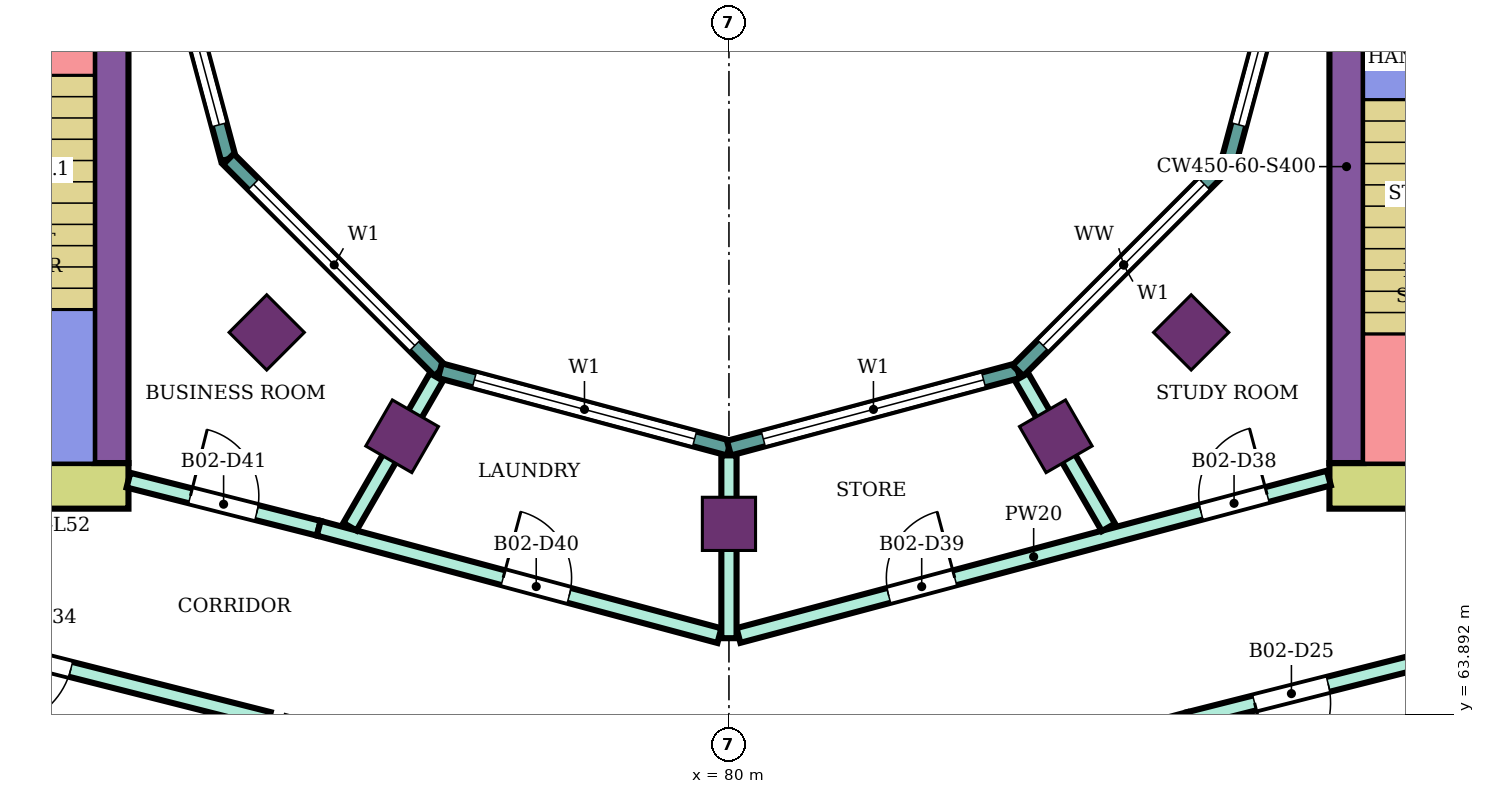
"""IFC4 building model, lengths in metres.
Left out: names, types, materials, properties, quantities, classifications, styles, units other than length and angle.
Written with IfcOpenShell. Run it as: python <this file> out.ifc"""

import sys

from ifc_helpers import new_model, si_unit, direction, frame, frame_2d, origin, origin_2d, place, context, subcontext, project, spatial, rectangle, extrude, element, fill, save


model = new_model("IFC4")
c1 = context("Model", 3, precision=1e-05, world=origin(), true_north=direction((0.0, 1.0)))
c2 = subcontext(c1, "Body", "Model", "MODEL_VIEW")
j1 = project(units=[si_unit("LENGTHUNIT", "METRE"), si_unit("PLANEANGLEUNIT", "RADIAN")], contexts=[c1])
p1 = place(None, origin())
s1 = spatial("IfcSite", under=j1, at=p1, CompositionType="ELEMENT")
p2 = place(p1, origin())
s2 = spatial("IfcBuilding", under=s1, at=p2, CompositionType="ELEMENT")
p3 = place(p2, frame((0.0, 0.0, 225.1)))
s3 = spatial("IfcBuildingStorey", under=s2, at=p3, CompositionType="ELEMENT", Elevation=225.1)
for number, where, z_axis, x_axis in (
    (1, (73.919, 68.919, 0.0), (0.0, 0.0, 1.0), (-0.707, -0.707, 0.0)),
    (2, (75.7, 67.552, 0.0), (0.0, 0.0, 1.0), (-0.5, -0.866, 0.0)),
    (3, (80.0, 66.4, 0.0), (0.0, 0.0, 1.0), (0.0, -1.0, 0.0)),
    (4, (84.3, 67.552, 0.0), (0.0, 0.0, 1.0), (0.5, -0.866, 0.0)),
    (5, (86.081, 68.919, 0.0), (0.0, 0.0, 1.0), (0.707, -0.707, 0.0)),
):
    element("IfcColumn", number, at=place(p3, frame(where, z_axis=z_axis, x_axis=x_axis)), inside=s3, PredefinedType="COLUMN", context=c2, shape_type="SweptSolid", body=[
        extrude(rectangle(XDim=0.7, YDim=0.7, at=origin_2d()), origin(), (0.0, 0.0, 1.0), 4.2),
    ])
p4 = place(p3, frame((87.9, 66.9, 0.0), z_axis=(0.0, 0.0, 1.0), x_axis=(1.0, 0.0, 0.0)))
e6 = element("IfcWall", 6, at=p4, inside=s3, PredefinedType="SHEAR", context=c2, shape_type="SweptSolid", body=[
    extrude(rectangle(XDim=14.9, YDim=0.6, at=frame_2d((7.45, 0.0))), origin(), (0.0, 0.0, 1.0), 3.8),
])
p5 = place(p4, frame((4.2, 0.0, 0.0)))
e7 = element("IfcOpeningElement", 7, at=p5, cuts=e6, PredefinedType="OPENING", context=c2, shape_type="SweptSolid", body=[
    extrude(rectangle(XDim=2.4, YDim=2.4, at=frame_2d((1.2, 1.2))), frame((0.0, 0.31, 0.0), z_axis=(0.0, -1.0, 0.0), x_axis=(1.0, 0.0, 0.0)), (0.0, 0.0, 1.0), 0.62),
])
p6 = place(p3, frame((88.125, 67.2, 0.0), z_axis=(0.0, 0.0, 1.0), x_axis=(0.0, 1.0, 0.0)))
e8 = element("IfcWall", 8, at=p6, inside=s3, PredefinedType="SHEAR", context=c2, shape_type="SweptSolid", body=[
    extrude(rectangle(XDim=7.8, YDim=0.45, at=frame_2d((3.9, 0.0))), origin(), (0.0, 0.0, 1.0), 3.8),
])
p7 = place(p3, frame((72.1, 66.9, 0.0), z_axis=(0.0, 0.0, 1.0), x_axis=(-1.0, 0.0, 0.0)))
e9 = element("IfcWall", 9, at=p7, inside=s3, PredefinedType="SHEAR", context=c2, shape_type="SweptSolid", body=[
    extrude(rectangle(XDim=14.9, YDim=0.6, at=frame_2d((7.45, 0.0))), origin(), (0.0, 0.0, 1.0), 3.8),
])
p8 = place(p7, frame((4.2, 0.0, 0.0)))
e10 = element("IfcOpeningElement", 10, at=p8, cuts=e9, PredefinedType="OPENING", context=c2, shape_type="SweptSolid", body=[
    extrude(rectangle(XDim=2.4, YDim=2.4, at=frame_2d((1.2, 1.2))), frame((0.0, 0.31, 0.0), z_axis=(0.0, -1.0, 0.0), x_axis=(1.0, 0.0, 0.0)), (0.0, 0.0, 1.0), 0.62),
])
p9 = place(p3, frame((71.875, 75.0, 0.0), z_axis=(0.0, 0.0, 1.0), x_axis=(0.0, -1.0, 0.0)))
e11 = element("IfcWall", 11, at=p9, inside=s3, PredefinedType="SHEAR", context=c2, shape_type="SweptSolid", body=[
    extrude(rectangle(XDim=7.8, YDim=0.45, at=frame_2d((3.9, 0.0))), origin(), (0.0, 0.0, 1.0), 3.8),
])
p10 = place(p3, frame((72.396, 75.0, 0.0), z_axis=(0.0, 0.0, 1.0), x_axis=(0.258789828301, -0.965933654434, 0.0)))
e12 = element("IfcWall", 12, at=p10, inside=s3, PredefinedType="NOTDEFINED", context=c2, shape_type="SweptSolid", body=[
    extrude(rectangle(XDim=3.936, YDim=0.2, at=frame_2d((1.968, 0.0))), origin(), (0.0, 0.0, 1.0), 4.2),
])
p11 = place(p10, frame((0.468, 0.0, 0.9)))
e13 = element("IfcOpeningElement", 13, at=p11, cuts=e12, PredefinedType="OPENING", context=c2, shape_type="SweptSolid", body=[
    extrude(rectangle(XDim=3.0, YDim=2.3, at=frame_2d((1.5, 1.15))), frame((0.0, 0.11, 0.0), z_axis=(0.0, -1.0, 0.0), x_axis=(1.0, 0.0, 0.0)), (0.0, 0.0, 1.0), 0.22),
])
p12 = place(p3, frame((73.415, 71.198, 0.0), z_axis=(0.0, 0.0, 1.0), x_axis=(0.707106781187, -0.707106781187, 0.0)))
e14 = element("IfcWall", 14, at=p12, inside=s3, PredefinedType="NOTDEFINED", context=c2, shape_type="SweptSolid", body=[
    extrude(rectangle(XDim=3.936, YDim=0.2, at=frame_2d((1.968, 0.0))), origin(), (0.0, 0.0, 1.0), 4.2),
])
p13 = place(p12, frame((0.468, 0.0, 0.9)))
e15 = element("IfcOpeningElement", 15, at=p13, cuts=e14, PredefinedType="OPENING", context=c2, shape_type="SweptSolid", body=[
    extrude(rectangle(XDim=3.0, YDim=2.3, at=frame_2d((1.5, 1.15))), frame((0.0, 0.11, 0.0), z_axis=(0.0, -1.0, 0.0), x_axis=(1.0, 0.0, 0.0)), (0.0, 0.0, 1.0), 0.22),
])
p14 = place(p3, frame((76.198, 68.415, 0.0), z_axis=(0.0, 0.0, 1.0), x_axis=(0.965933654434, -0.258789828301, 0.0)))
e16 = element("IfcWall", 16, at=p14, inside=s3, PredefinedType="NOTDEFINED", context=c2, shape_type="SweptSolid", body=[
    extrude(rectangle(XDim=3.936, YDim=0.2, at=frame_2d((1.968, 0.0))), origin(), (0.0, 0.0, 1.0), 4.2),
])
p15 = place(p14, frame((0.468, 0.0, 0.9)))
e17 = element("IfcOpeningElement", 17, at=p15, cuts=e16, PredefinedType="OPENING", context=c2, shape_type="SweptSolid", body=[
    extrude(rectangle(XDim=3.0, YDim=2.3, at=frame_2d((1.5, 1.15))), frame((0.0, 0.11, 0.0), z_axis=(0.0, -1.0, 0.0), x_axis=(1.0, 0.0, 0.0)), (0.0, 0.0, 1.0), 0.22),
])
p16 = place(p3, frame((80.0, 67.396, 0.0), z_axis=(0.0, 0.0, 1.0), x_axis=(0.965933654434, 0.258789828301, 0.0)))
e18 = element("IfcWall", 18, at=p16, inside=s3, PredefinedType="NOTDEFINED", context=c2, shape_type="SweptSolid", body=[
    extrude(rectangle(XDim=3.936, YDim=0.2, at=frame_2d((1.968, 0.0))), origin(), (0.0, 0.0, 1.0), 4.2),
])
p17 = place(p16, frame((0.468, 0.0, 0.9)))
e19 = element("IfcOpeningElement", 19, at=p17, cuts=e18, PredefinedType="OPENING", context=c2, shape_type="SweptSolid", body=[
    extrude(rectangle(XDim=3.0, YDim=2.3, at=frame_2d((1.5, 1.15))), frame((0.0, 0.11, 0.0), z_axis=(0.0, -1.0, 0.0), x_axis=(1.0, 0.0, 0.0)), (0.0, 0.0, 1.0), 0.22),
])
p18 = place(p3, frame((83.802, 68.415, 0.0), z_axis=(0.0, 0.0, 1.0), x_axis=(0.707106781187, 0.707106781187, 0.0)))
e20 = element("IfcWall", 20, at=p18, inside=s3, PredefinedType="NOTDEFINED", context=c2, shape_type="SweptSolid", body=[
    extrude(rectangle(XDim=3.936, YDim=0.2, at=frame_2d((1.968, 0.0))), origin(), (0.0, 0.0, 1.0), 4.2),
])
p19 = place(p18, frame((0.468, 0.0, 0.9)))
e21 = element("IfcOpeningElement", 21, at=p19, cuts=e20, PredefinedType="OPENING", context=c2, shape_type="SweptSolid", body=[
    extrude(rectangle(XDim=3.0, YDim=2.3, at=frame_2d((1.5, 1.15))), frame((0.0, 0.11, 0.0), z_axis=(0.0, -1.0, 0.0), x_axis=(1.0, 0.0, 0.0)), (0.0, 0.0, 1.0), 0.22),
])
p20 = place(p3, frame((86.585, 71.198, 0.0), z_axis=(0.0, 0.0, 1.0), x_axis=(0.258789828301, 0.965933654434, 0.0)))
e22 = element("IfcWall", 22, at=p20, inside=s3, PredefinedType="NOTDEFINED", context=c2, shape_type="SweptSolid", body=[
    extrude(rectangle(XDim=3.936, YDim=0.2, at=frame_2d((1.968, 0.0))), origin(), (0.0, 0.0, 1.0), 4.2),
])
p21 = place(p20, frame((0.468, 0.0, 0.9)))
e23 = element("IfcOpeningElement", 23, at=p21, cuts=e22, PredefinedType="OPENING", context=c2, shape_type="SweptSolid", body=[
    extrude(rectangle(XDim=3.0, YDim=2.3, at=frame_2d((1.5, 1.15))), frame((0.0, 0.11, 0.0), z_axis=(0.0, -1.0, 0.0), x_axis=(1.0, 0.0, 0.0)), (0.0, 0.0, 1.0), 0.22),
])
p22 = place(p3, frame((68.2, 65.28, 0.0), z_axis=(0.0, 0.0, 1.0), x_axis=(0.969450596516, -0.245286650503, 0.0)))
e24 = element("IfcWall", 24, at=p22, inside=s3, PredefinedType="PARTITIONING", context=c2, shape_type="SweptSolid", body=[
    extrude(rectangle(XDim=5.928, YDim=0.2, at=frame_2d((2.964, 0.0))), origin(), (0.0, 0.0, 1.0), 3.75),
])
p23 = place(p22, frame((2.24, 0.0, 0.0)))
e25 = element("IfcOpeningElement", 25, at=p23, cuts=e24, PredefinedType="OPENING", context=c2, shape_type="SweptSolid", body=[
    extrude(rectangle(XDim=1.0, YDim=2.1, at=frame_2d((0.5, 1.05))), frame((0.0, 0.11, 0.0), z_axis=(0.0, -1.0, 0.0), x_axis=(1.0, 0.0, 0.0)), (0.0, 0.0, 1.0), 0.22),
])
p24 = place(p3, frame((72.1, 66.975, 0.0), z_axis=(0.0, 0.0, 1.0), x_axis=(0.969471314457, -0.245204752086, 0.0)))
e26 = element("IfcWall", 26, at=p24, inside=s3, PredefinedType="PARTITIONING", context=c2, shape_type="SweptSolid", body=[
    extrude(rectangle(XDim=2.582, YDim=0.2, at=frame_2d((1.291, 0.0))), origin(), (0.0, 0.0, 1.0), 3.75),
])
p25 = place(p24, frame((0.841, 0.0, 0.0)))
e27 = element("IfcOpeningElement", 27, at=p25, cuts=e26, PredefinedType="OPENING", context=c2, shape_type="SweptSolid", body=[
    extrude(rectangle(XDim=0.9, YDim=2.1, at=frame_2d((0.45, 1.05))), frame((0.0, 0.11, 0.0), z_axis=(0.0, -1.0, 0.0), x_axis=(1.0, 0.0, 0.0)), (0.0, 0.0, 1.0), 0.22),
])
p26 = place(p3, frame((74.603, 66.342, 0.0), z_axis=(0.0, 0.0, 1.0), x_axis=(0.965920893652, -0.258837453254, 0.0)))
e28 = element("IfcWall", 28, at=p26, inside=s3, PredefinedType="PARTITIONING", context=c2, shape_type="SweptSolid", body=[
    extrude(rectangle(XDim=5.458, YDim=0.2, at=frame_2d((2.729, 0.0))), origin(), (0.0, 0.0, 1.0), 3.75),
])
p27 = place(p26, frame((2.512, 0.0, 0.0)))
e29 = element("IfcOpeningElement", 29, at=p27, cuts=e28, PredefinedType="OPENING", context=c2, shape_type="SweptSolid", body=[
    extrude(rectangle(XDim=0.9, YDim=2.1, at=frame_2d((0.45, 1.05))), frame((0.0, 0.11, 0.0), z_axis=(0.0, -1.0, 0.0), x_axis=(1.0, 0.0, 0.0)), (0.0, 0.0, 1.0), 0.22),
])
p28 = place(p3, frame((75.014, 66.362, 0.0), z_axis=(0.0, 0.0, 1.0), x_axis=(0.500143511652, 0.865942531438, 0.0)))
e30 = element("IfcWall", 30, at=p28, inside=s3, PredefinedType="PARTITIONING", context=c2, shape_type="SweptSolid", body=[
    extrude(rectangle(XDim=2.275, YDim=0.2, at=frame_2d((1.138, 0.0))), origin(), (0.0, 0.0, 1.0), 3.75),
])
p29 = place(p3, frame((80.125, 64.932, 0.0), z_axis=(0.0, 0.0, 1.0), x_axis=(0.966236955806, 0.257655089674, 0.0)))
e31 = element("IfcWall", 31, at=p29, inside=s3, PredefinedType="PARTITIONING", context=c2, shape_type="SweptSolid", body=[
    extrude(rectangle(XDim=8.039, YDim=0.2, at=frame_2d((4.02, 0.0))), origin(), (0.0, 0.0, 1.0), 3.75),
])
p30 = place(p29, frame((6.298, 0.0, 0.0)))
e32 = element("IfcOpeningElement", 32, at=p30, cuts=e31, PredefinedType="OPENING", context=c2, shape_type="SweptSolid", body=[
    extrude(rectangle(XDim=0.9, YDim=2.1, at=frame_2d((0.45, 1.05))), frame((0.0, 0.11, 0.0), z_axis=(0.0, -1.0, 0.0), x_axis=(1.0, 0.0, 0.0)), (0.0, 0.0, 1.0), 0.22),
])
p31 = place(p29, frame((2.045, 0.0, 0.0)))
e33 = element("IfcOpeningElement", 33, at=p31, cuts=e31, PredefinedType="OPENING", context=c2, shape_type="SweptSolid", body=[
    extrude(rectangle(XDim=0.9, YDim=2.1, at=frame_2d((0.45, 1.05))), frame((0.0, 0.11, 0.0), z_axis=(0.0, -1.0, 0.0), x_axis=(1.0, 0.0, 0.0)), (0.0, 0.0, 1.0), 0.22),
])
p32 = place(p3, frame((80.0, 62.204, 0.0), z_axis=(0.0, 0.0, 1.0), x_axis=(0.965938139786, 0.258773086132, 0.0)))
e34 = element("IfcWall", 34, at=p32, inside=s3, PredefinedType="PARTITIONING", context=c2, shape_type="SweptSolid", body=[
    extrude(rectangle(XDim=6.266, YDim=0.2, at=frame_2d((3.133, 0.0))), origin(), (0.0, 0.0, 1.0), 3.75),
])
p33 = place(p3, frame((80.0, 64.896, 0.0), z_axis=(0.0, 0.0, 1.0), x_axis=(0.0, 1.0, 0.0)))
e35 = element("IfcWall", 35, at=p33, inside=s3, PredefinedType="PARTITIONING", context=c2, shape_type="SweptSolid", body=[
    extrude(rectangle(XDim=2.405, YDim=0.2, at=frame_2d((1.203, 0.0))), origin(), (0.0, 0.0, 1.0), 3.75),
])
p34 = place(p3, frame((83.85, 68.333, 0.0), z_axis=(0.0, 0.0, 1.0), x_axis=(0.500080019051, -0.865979199835, 0.0)))
e36 = element("IfcWall", 36, at=p34, inside=s3, PredefinedType="PARTITIONING", context=c2, shape_type="SweptSolid", body=[
    extrude(rectangle(XDim=2.285, YDim=0.2, at=frame_2d((1.143, 0.0))), origin(), (0.0, 0.0, 1.0), 3.75),
])
p35 = place(p3, frame((86.053, 63.826, 0.0), z_axis=(0.0, 0.0, 1.0), x_axis=(0.969490004987, 0.245130843083, 0.0)))
e37 = element("IfcWall", 37, at=p35, inside=s3, PredefinedType="PARTITIONING", context=c2, shape_type="SweptSolid", body=[
    extrude(rectangle(XDim=5.908, YDim=0.2, at=frame_2d((2.954, 0.0))), origin(), (0.0, 0.0, 1.0), 3.75),
])
p36 = place(p35, frame((0.889, 0.0, 0.0)))
e38 = element("IfcOpeningElement", 38, at=p36, cuts=e37, PredefinedType="OPENING", context=c2, shape_type="SweptSolid", body=[
    extrude(rectangle(XDim=1.0, YDim=2.1, at=frame_2d((0.5, 1.05))), frame((0.0, 0.11, 0.0), z_axis=(0.0, -1.0, 0.0), x_axis=(1.0, 0.0, 0.0)), (0.0, 0.0, 1.0), 0.22),
])
p37 = place(p11, origin())
e39 = element("IfcWindow", 39, at=p37, inside=s3, PartitioningType="SINGLE_PANEL", PredefinedType="WINDOW", context=c2, shape_type="SweptSolid", body=[
    extrude(rectangle(XDim=3.0, YDim=2.3, at=frame_2d((1.5, 1.15))), frame((0.0, 0.03, 0.0), z_axis=(0.0, -1.0, 0.0), x_axis=(1.0, 0.0, 0.0)), (0.0, 0.0, 1.0), 0.06),
])
fill(e13, e39)
p38 = place(p13, origin())
e40 = element("IfcWindow", 40, at=p38, inside=s3, PartitioningType="SINGLE_PANEL", PredefinedType="WINDOW", context=c2, shape_type="SweptSolid", body=[
    extrude(rectangle(XDim=3.0, YDim=2.3, at=frame_2d((1.5, 1.15))), frame((0.0, 0.03, 0.0), z_axis=(0.0, -1.0, 0.0), x_axis=(1.0, 0.0, 0.0)), (0.0, 0.0, 1.0), 0.06),
])
fill(e15, e40)
p39 = place(p15, origin())
e41 = element("IfcWindow", 41, at=p39, inside=s3, PartitioningType="SINGLE_PANEL", PredefinedType="WINDOW", context=c2, shape_type="SweptSolid", body=[
    extrude(rectangle(XDim=3.0, YDim=2.3, at=frame_2d((1.5, 1.15))), frame((0.0, 0.03, 0.0), z_axis=(0.0, -1.0, 0.0), x_axis=(1.0, 0.0, 0.0)), (0.0, 0.0, 1.0), 0.06),
])
fill(e17, e41)
p40 = place(p17, origin())
e42 = element("IfcWindow", 42, at=p40, inside=s3, PartitioningType="SINGLE_PANEL", PredefinedType="WINDOW", context=c2, shape_type="SweptSolid", body=[
    extrude(rectangle(XDim=3.0, YDim=2.3, at=frame_2d((1.5, 1.15))), frame((0.0, 0.03, 0.0), z_axis=(0.0, -1.0, 0.0), x_axis=(1.0, 0.0, 0.0)), (0.0, 0.0, 1.0), 0.06),
])
fill(e19, e42)
p41 = place(p19, origin())
e43 = element("IfcWindow", 43, at=p41, inside=s3, PartitioningType="SINGLE_PANEL", PredefinedType="WINDOW", context=c2, shape_type="SweptSolid", body=[
    extrude(rectangle(XDim=3.0, YDim=2.3, at=frame_2d((1.5, 1.15))), frame((0.0, 0.03, 0.0), z_axis=(0.0, -1.0, 0.0), x_axis=(1.0, 0.0, 0.0)), (0.0, 0.0, 1.0), 0.06),
])
fill(e21, e43)
p42 = place(p21, origin())
e44 = element("IfcWindow", 44, at=p42, inside=s3, PartitioningType="SINGLE_PANEL", PredefinedType="WINDOW", context=c2, shape_type="SweptSolid", body=[
    extrude(rectangle(XDim=3.0, YDim=2.3, at=frame_2d((1.5, 1.15))), frame((0.0, 0.03, 0.0), z_axis=(0.0, -1.0, 0.0), x_axis=(1.0, 0.0, 0.0)), (0.0, 0.0, 1.0), 0.06),
])
fill(e23, e44)
p43 = place(p36, frame((1.0, 0.0, 0.0), z_axis=(0.0, 0.0, 1.0), x_axis=(-1.0, 0.0, 0.0)))
e45 = element("IfcDoor", 45, at=p43, inside=s3, OperationType="SINGLE_SWING_RIGHT", PredefinedType="DOOR", context=c2, shape_type="SweptSolid", body=[
    extrude(rectangle(XDim=1.0, YDim=2.1, at=frame_2d((0.5, 1.05))), frame((0.0, 0.025, 0.0), z_axis=(0.0, -1.0, 0.0), x_axis=(1.0, 0.0, 0.0)), (0.0, 0.0, 1.0), 0.05),
])
fill(e38, e45)
p44 = place(p23, frame((1.0, 0.0, 0.0), z_axis=(0.0, 0.0, 1.0), x_axis=(-1.0, 0.0, 0.0)))
e46 = element("IfcDoor", 46, at=p44, inside=s3, OperationType="SINGLE_SWING_RIGHT", PredefinedType="DOOR", context=c2, shape_type="SweptSolid", body=[
    extrude(rectangle(XDim=1.0, YDim=2.1, at=frame_2d((0.5, 1.05))), frame((0.0, 0.025, 0.0), z_axis=(0.0, -1.0, 0.0), x_axis=(1.0, 0.0, 0.0)), (0.0, 0.0, 1.0), 0.05),
])
fill(e25, e46)
p45 = place(p30, origin())
e47 = element("IfcDoor", 47, at=p45, inside=s3, OperationType="SINGLE_SWING_RIGHT", PredefinedType="DOOR", context=c2, shape_type="SweptSolid", body=[
    extrude(rectangle(XDim=0.9, YDim=2.1, at=frame_2d((0.45, 1.05))), frame((0.0, 0.025, 0.0), z_axis=(0.0, -1.0, 0.0), x_axis=(1.0, 0.0, 0.0)), (0.0, 0.0, 1.0), 0.05),
])
fill(e32, e47)
p46 = place(p31, origin())
e48 = element("IfcDoor", 48, at=p46, inside=s3, OperationType="SINGLE_SWING_RIGHT", PredefinedType="DOOR", context=c2, shape_type="SweptSolid", body=[
    extrude(rectangle(XDim=0.9, YDim=2.1, at=frame_2d((0.45, 1.05))), frame((0.0, 0.025, 0.0), z_axis=(0.0, -1.0, 0.0), x_axis=(1.0, 0.0, 0.0)), (0.0, 0.0, 1.0), 0.05),
])
fill(e33, e48)
p47 = place(p27, origin())
e49 = element("IfcDoor", 49, at=p47, inside=s3, OperationType="SINGLE_SWING_LEFT", PredefinedType="DOOR", context=c2, shape_type="SweptSolid", body=[
    extrude(rectangle(XDim=0.9, YDim=2.1, at=frame_2d((0.45, 1.05))), frame((0.0, 0.025, 0.0), z_axis=(0.0, -1.0, 0.0), x_axis=(1.0, 0.0, 0.0)), (0.0, 0.0, 1.0), 0.05),
])
fill(e29, e49)
p48 = place(p25, origin())
e50 = element("IfcDoor", 50, at=p48, inside=s3, OperationType="SINGLE_SWING_LEFT", PredefinedType="DOOR", context=c2, shape_type="SweptSolid", body=[
    extrude(rectangle(XDim=0.9, YDim=2.1, at=frame_2d((0.45, 1.05))), frame((0.0, 0.025, 0.0), z_axis=(0.0, -1.0, 0.0), x_axis=(1.0, 0.0, 0.0)), (0.0, 0.0, 1.0), 0.05),
])
fill(e27, e50)
save(model, sys.argv[1])
